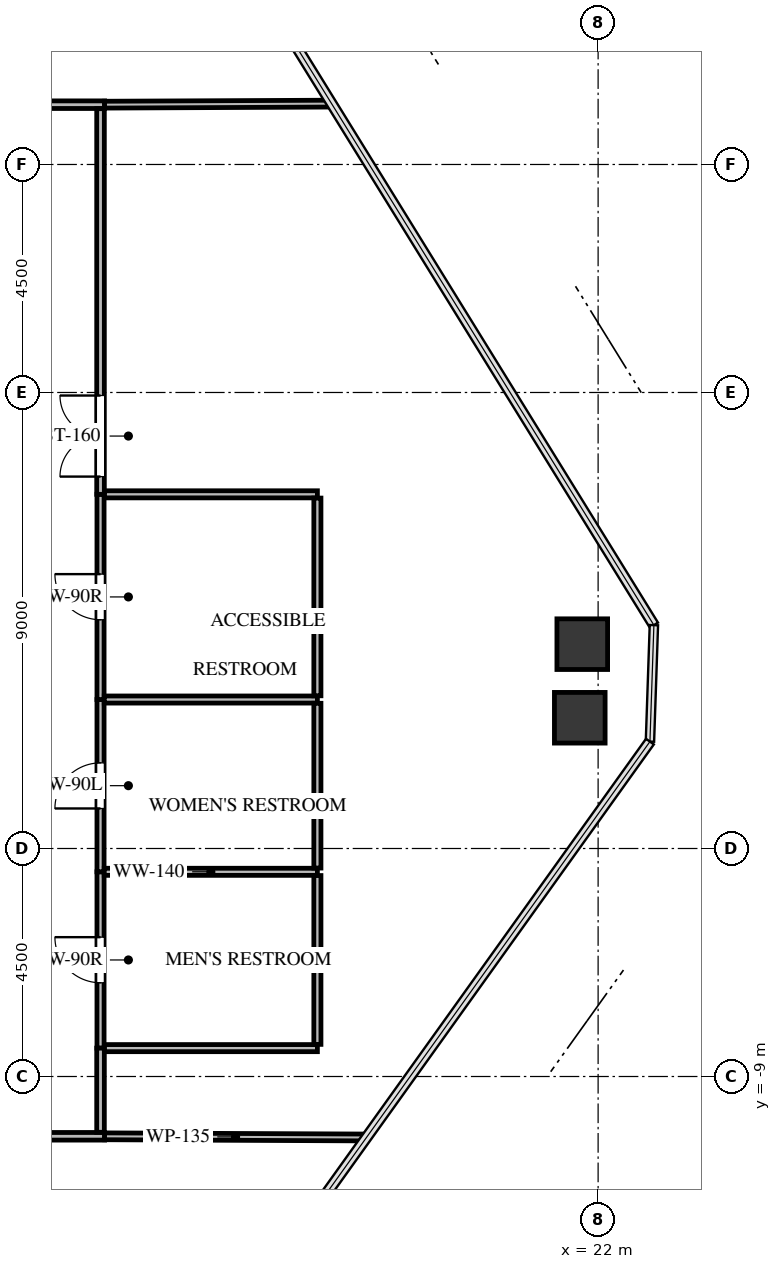
"""IFC4 building model, lengths in metres.
Left out: names, types, materials, properties, quantities, classifications, styles, units other than length and angle.
Written with IfcOpenShell. Run it as: python <this file> out.ifc"""

import sys

from ifc_helpers import new_model, si_unit, direction, frame, frame_2d, origin, origin_2d, place, context, subcontext, project, spatial, rectangle, extrude, source, transform, mapped, element, fill, save


model = new_model("IFC4")
c1 = context("Model", 3, precision=1e-05, world=origin(), true_north=direction((0.0, 1.0)))
c2 = subcontext(c1, "Body", "Model", "MODEL_VIEW")
j1 = project(units=[si_unit("LENGTHUNIT", "METRE"), si_unit("PLANEANGLEUNIT", "RADIAN")], contexts=[c1])
p1 = place(None, origin())
s1 = spatial("IfcSite", under=j1, at=p1, CompositionType="ELEMENT")
p2 = place(p1, origin())
s2 = spatial("IfcBuilding", under=s1, at=p2, CompositionType="ELEMENT")
p3 = place(p2, frame((0.0, 0.0, 170.5)))
s3 = spatial("IfcBuildingStorey", under=s2, at=p3, CompositionType="ELEMENT", Elevation=170.5)
m1 = source(origin(), c2, "Body", "SweptSolid", [
    extrude(rectangle(XDim=1.0, YDim=1.0, at=origin_2d()), origin(), (0.0, 0.0, 1.0), 3.3),
])
for number, where, z_axis, x_axis in (
    (1, (21.687, -0.467, -0.24), (0.0, 0.0, 1.0), (1.0, 0.0, 0.0)),
    (2, (21.638, -1.92, -0.24), (0.0, 0.0, 1.0), (1.0, 0.0, 0.0)),
):
    element("IfcColumn", number, at=place(p3, frame(where, z_axis=z_axis, x_axis=x_axis)), inside=s3, PredefinedType="COLUMN", context=c2, shape_type="MappedRepresentation", body=[
        mapped(m1, transform((0.0, 0.0, 0.0), x_axis=(1.0, 0.0, 0.0), y_axis=(0.0, 1.0, 0.0), z_axis=(0.0, 0.0, 1.0), scale=1.0)),
    ])
p4 = place(p3, frame((12.18, -8.44, 0.0), z_axis=(0.0, 0.0, 1.0), x_axis=(0.0, 1.0, 0.0)))
e3 = element("IfcWall", 3, at=p4, inside=s3, PredefinedType="PARTITIONING", context=c2, shape_type="SweptSolid", body=[
    extrude(rectangle(XDim=3.48, YDim=0.14, at=frame_2d((1.74, 0.0))), origin(), (0.0, 0.0, 1.0), 3.045),
])
p5 = place(p4, frame((1.29, 0.0, 0.0)))
e4 = element("IfcOpeningElement", 4, at=p5, cuts=e3, PredefinedType="OPENING", context=c2, shape_type="SweptSolid", body=[
    extrude(rectangle(XDim=0.9, YDim=2.05, at=frame_2d((0.45, 1.025))), frame((0.0, 0.08, 0.0), z_axis=(0.0, -1.0, 0.0), x_axis=(1.0, 0.0, 0.0)), (0.0, 0.0, 1.0), 0.16),
])
p6 = place(p3, frame((12.18, -4.96, 0.0), z_axis=(0.0, 0.0, 1.0), x_axis=(0.0, 1.0, 0.0)))
e5 = element("IfcWall", 5, at=p6, inside=s3, PredefinedType="PARTITIONING", context=c2, shape_type="SweptSolid", body=[
    extrude(rectangle(XDim=3.4, YDim=0.14, at=frame_2d((1.7, 0.0))), origin(), (0.0, 0.0, 1.0), 3.045),
])
p7 = place(p6, frame((1.25, 0.0, 0.0)))
e6 = element("IfcOpeningElement", 6, at=p7, cuts=e5, PredefinedType="OPENING", context=c2, shape_type="SweptSolid", body=[
    extrude(rectangle(XDim=0.9, YDim=2.05, at=frame_2d((0.45, 1.025))), frame((0.0, 0.08, 0.0), z_axis=(0.0, -1.0, 0.0), x_axis=(1.0, 0.0, 0.0)), (0.0, 0.0, 1.0), 0.16),
])
p8 = place(p3, frame((12.18, -1.56, 0.0), z_axis=(0.0, 0.0, 1.0), x_axis=(0.0, 1.0, 0.0)))
e7 = element("IfcWall", 7, at=p8, inside=s3, PredefinedType="PARTITIONING", context=c2, shape_type="SweptSolid", body=[
    extrude(rectangle(XDim=4.05, YDim=0.14, at=frame_2d((2.025, 0.0))), origin(), (0.0, 0.0, 1.0), 2.242),
])
p9 = place(p8, frame((1.575, 0.0, 0.0)))
e8 = element("IfcOpeningElement", 8, at=p9, cuts=e7, PredefinedType="OPENING", context=c2, shape_type="SweptSolid", body=[
    extrude(rectangle(XDim=0.9, YDim=2.05, at=frame_2d((0.45, 1.025))), frame((0.0, 0.08, 0.0), z_axis=(0.0, -1.0, 0.0), x_axis=(1.0, 0.0, 0.0)), (0.0, 0.0, 1.0), 0.16),
])
p10 = place(p3, frame((12.26, 10.18, 0.0), z_axis=(0.0, 0.0, 1.0), x_axis=(-1.0, 0.0, 0.0)))
e9 = element("IfcWall", 9, at=p10, inside=s3, PredefinedType="PARTITIONING", context=c2, shape_type="SweptSolid", body=[
    extrude(rectangle(XDim=11.25, YDim=0.15, at=frame_2d((5.625, 0.0))), origin(), (0.0, 0.0, 1.0), 2.242),
])
p11 = place(p10, frame((4.825, 0.0, 0.0)))
e10 = element("IfcOpeningElement", 10, at=p11, cuts=e9, PredefinedType="OPENING", context=c2, shape_type="SweptSolid", body=[
    extrude(rectangle(XDim=1.6, YDim=2.15, at=frame_2d((0.8, 1.075))), frame((0.0, 0.085, 0.0), z_axis=(0.0, -1.0, 0.0), x_axis=(1.0, 0.0, 0.0)), (0.0, 0.0, 1.0), 0.17),
])
p12 = place(p3, frame((1.01, -10.18, 0.0), z_axis=(0.0, 0.0, 1.0), x_axis=(1.0, 0.0, 0.0)))
e11 = element("IfcWall", 11, at=p12, inside=s3, PredefinedType="PARTITIONING", context=c2, shape_type="SweptSolid", body=[
    extrude(rectangle(XDim=11.25, YDim=0.15, at=frame_2d((5.625, 0.0))), origin(), (0.0, 0.0, 1.0), 2.242),
])
p13 = place(p12, frame((5.165, 0.0, 0.0)))
e12 = element("IfcOpeningElement", 12, at=p13, cuts=e11, PredefinedType="OPENING", context=c2, shape_type="SweptSolid", body=[
    extrude(rectangle(XDim=0.92, YDim=2.1, at=frame_2d((0.46, 1.05))), frame((0.0, 0.085, 0.0), z_axis=(0.0, -1.0, 0.0), x_axis=(1.0, 0.0, 0.0)), (0.0, 0.0, 1.0), 0.17),
])
p14 = place(p3, frame((12.18, 2.49, 0.0), z_axis=(0.0, 0.0, 1.0), x_axis=(0.0, 1.0, 0.0)))
e13 = element("IfcWall", 13, at=p14, inside=s3, PredefinedType="PARTITIONING", context=c2, shape_type="SweptSolid", body=[
    extrude(rectangle(XDim=7.611, YDim=0.15, at=frame_2d((3.806, 0.0))), origin(), (0.0, 0.0, 1.0), 3.045),
])
p15 = place(p14, frame((0.35, 0.0, 0.0)))
e14 = element("IfcOpeningElement", 14, at=p15, cuts=e13, PredefinedType="OPENING", context=c2, shape_type="SweptSolid", body=[
    extrude(rectangle(XDim=1.6, YDim=2.15, at=frame_2d((0.8, 1.075))), frame((0.0, 0.085, 0.0), z_axis=(0.0, -1.0, 0.0), x_axis=(1.0, 0.0, 0.0)), (0.0, 0.0, 1.0), 0.17),
])
p16 = place(p3, frame((12.18, -10.101, 0.0), z_axis=(0.0, 0.0, 1.0), x_axis=(0.0, 1.0, 0.0)))
e15 = element("IfcWall", 15, at=p16, inside=s3, PredefinedType="PARTITIONING", context=c2, shape_type="SweptSolid", body=[
    extrude(rectangle(XDim=1.661, YDim=0.15, at=frame_2d((0.831, 0.0))), origin(), (0.0, 0.0, 1.0), 3.045),
])
p17 = place(p3, frame((12.254, -4.96, 0.0), z_axis=(0.0, 0.0, 1.0), x_axis=(1.0, 0.0, 0.0)))
e16 = element("IfcWall", 16, at=p17, inside=s3, PredefinedType="PARTITIONING", context=c2, shape_type="SweptSolid", body=[
    extrude(rectangle(XDim=4.206, YDim=0.14, at=frame_2d((2.103, 0.0))), origin(), (0.0, 0.0, 1.0), 3.045),
])
p18 = place(p3, frame((16.46, -8.44, 0.0), z_axis=(0.0, 0.0, 1.0), x_axis=(-1.0, 0.0, 0.0)))
e17 = element("IfcWall", 17, at=p18, inside=s3, PredefinedType="PARTITIONING", context=c2, shape_type="SweptSolid", body=[
    extrude(rectangle(XDim=4.201, YDim=0.14, at=frame_2d((2.101, 0.0))), origin(), (0.0, 0.0, 1.0), 3.045),
])
p19 = place(p3, frame((16.46, -5.034, 0.0), z_axis=(0.0, 0.0, 1.0), x_axis=(0.0, -1.0, 0.0)))
e18 = element("IfcWall", 18, at=p19, inside=s3, PredefinedType="PARTITIONING", context=c2, shape_type="SweptSolid", body=[
    extrude(rectangle(XDim=3.332, YDim=0.14, at=frame_2d((1.666, 0.0))), origin(), (0.0, 0.0, 1.0), 3.045),
])
p20 = place(p3, frame((12.254, -1.56, 0.0), z_axis=(0.0, 0.0, 1.0), x_axis=(1.0, 0.0, 0.0)))
e19 = element("IfcWall", 19, at=p20, inside=s3, PredefinedType="PARTITIONING", context=c2, shape_type="SweptSolid", body=[
    extrude(rectangle(XDim=4.206, YDim=0.14, at=frame_2d((2.103, 0.0))), origin(), (0.0, 0.0, 1.0), 3.045),
])
p21 = place(p3, frame((16.46, -1.634, 0.0), z_axis=(0.0, 0.0, 1.0), x_axis=(0.0, -1.0, 0.0)))
e20 = element("IfcWall", 20, at=p21, inside=s3, PredefinedType="PARTITIONING", context=c2, shape_type="SweptSolid", body=[
    extrude(rectangle(XDim=3.252, YDim=0.14, at=frame_2d((1.626, 0.0))), origin(), (0.0, 0.0, 1.0), 3.045),
])
p22 = place(p3, frame((12.259, 2.49, 0.0), z_axis=(0.0, 0.0, 1.0), x_axis=(1.0, 0.0, 0.0)))
e21 = element("IfcWall", 21, at=p22, inside=s3, PredefinedType="PARTITIONING", context=c2, shape_type="SweptSolid", body=[
    extrude(rectangle(XDim=4.201, YDim=0.14, at=frame_2d((2.101, 0.0))), origin(), (0.0, 0.0, 1.0), 3.045),
])
p23 = place(p3, frame((16.46, 2.416, 0.0), z_axis=(0.0, 0.0, 1.0), x_axis=(0.0, -1.0, 0.0)))
e22 = element("IfcWall", 22, at=p23, inside=s3, PredefinedType="PARTITIONING", context=c2, shape_type="SweptSolid", body=[
    extrude(rectangle(XDim=3.902, YDim=0.14, at=frame_2d((1.951, 0.0))), origin(), (0.0, 0.0, 1.0), 2.242),
])
p24 = place(p3, frame((16.74, 10.201, 0.0), z_axis=(0.0, 0.0, 1.0), x_axis=(-0.999989522694, -0.004577608714, 0.0)))
e23 = element("IfcWall", 23, at=p24, inside=s3, PredefinedType="PARTITIONING", context=c2, shape_type="SweptSolid", body=[
    extrude(rectangle(XDim=4.48, YDim=0.135, at=frame_2d((2.24, 0.0))), origin(), (0.0, 0.0, 1.0), 2.399),
])
p25 = place(p3, frame((12.26, -10.18, 0.0), z_axis=(0.0, 0.0, 1.0), x_axis=(0.999990144117, -0.004439782427, 0.0)))
e24 = element("IfcWall", 24, at=p25, inside=s3, PredefinedType="PARTITIONING", context=c2, shape_type="SweptSolid", body=[
    extrude(rectangle(XDim=5.169, YDim=0.135, at=frame_2d((2.584, 0.0))), origin(), (0.0, 0.0, 1.0), 2.399),
])
m2 = source(origin(), c2, "Body", "SweptSolid", [
    extrude(rectangle(XDim=0.9, YDim=2.05, at=frame_2d((0.45, 1.025))), frame((0.0, 0.025, 0.0), z_axis=(0.0, -1.0, 0.0), x_axis=(1.0, 0.0, 0.0)), (0.0, 0.0, 1.0), 0.05),
])
p26 = place(p5, origin())
e25 = element("IfcDoor", 25, at=p26, inside=s3, OperationType="SINGLE_SWING_RIGHT", PredefinedType="DOOR", context=c2, shape_type="MappedRepresentation", body=[
    mapped(m2, transform((0.0, 0.0, 0.0), x_axis=(1.0, 0.0, 0.0), y_axis=(0.0, 1.0, 0.0), z_axis=(0.0, 0.0, 1.0), scale=1.0)),
])
fill(e4, e25)
m3 = source(origin(), c2, "Body", "SweptSolid", [
    extrude(rectangle(XDim=0.9, YDim=2.05, at=frame_2d((0.45, 1.025))), frame((0.0, 0.025, 0.0), z_axis=(0.0, -1.0, 0.0), x_axis=(1.0, 0.0, 0.0)), (0.0, 0.0, 1.0), 0.05),
])
p27 = place(p7, origin())
e26 = element("IfcDoor", 26, at=p27, inside=s3, OperationType="SINGLE_SWING_LEFT", PredefinedType="DOOR", context=c2, shape_type="MappedRepresentation", body=[
    mapped(m3, transform((0.0, 0.0, 0.0), x_axis=(1.0, 0.0, 0.0), y_axis=(0.0, 1.0, 0.0), z_axis=(0.0, 0.0, 1.0), scale=1.0)),
])
fill(e6, e26)
p28 = place(p9, origin())
e27 = element("IfcDoor", 27, at=p28, inside=s3, OperationType="SINGLE_SWING_RIGHT", PredefinedType="DOOR", context=c2, shape_type="MappedRepresentation", body=[
    mapped(m2, transform((0.0, 0.0, 0.0), x_axis=(1.0, 0.0, 0.0), y_axis=(0.0, 1.0, 0.0), z_axis=(0.0, 0.0, 1.0), scale=1.0)),
])
fill(e8, e27)
m4 = source(origin(), c2, "Body", "SweptSolid", [
    extrude(rectangle(XDim=1.6, YDim=2.15, at=frame_2d((0.8, 1.075))), frame((0.0, 0.025, 0.0), z_axis=(0.0, -1.0, 0.0), x_axis=(1.0, 0.0, 0.0)), (0.0, 0.0, 1.0), 0.05),
])
p29 = place(p15, origin())
e28 = element("IfcDoor", 28, at=p29, inside=s3, OperationType="DOUBLE_DOOR_SINGLE_SWING", PredefinedType="DOOR", context=c2, shape_type="MappedRepresentation", body=[
    mapped(m4, transform((0.0, 0.0, 0.0), x_axis=(1.0, 0.0, 0.0), y_axis=(0.0, 1.0, 0.0), z_axis=(0.0, 0.0, 1.0), scale=1.0)),
])
fill(e14, e28)
save(model, sys.argv[1])
